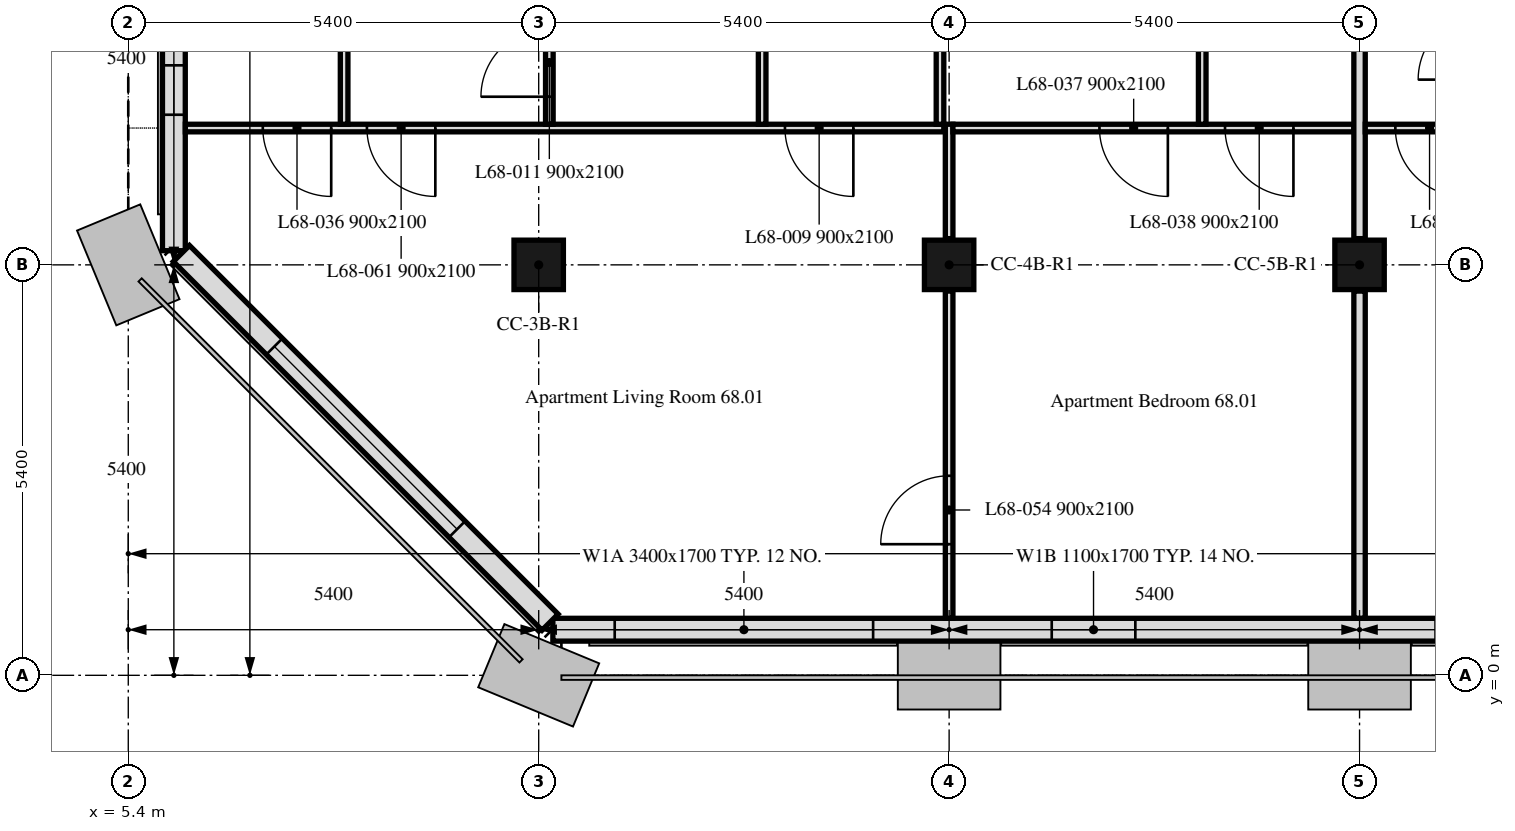
"""IFC4 building model, lengths in metres.
Left out: names, types, materials, properties, quantities, classifications, styles, units other than length and angle.
Written with IfcOpenShell. Run it as: python <this file> out.ifc"""

import sys

from ifc_helpers import new_model, si_unit, direction, frame, frame_2d, origin, origin_2d, place, context, subcontext, project, spatial, rectangle, extrude, element, fill, save


model = new_model("IFC4")
c1 = context("Model", 3, precision=1e-05, world=origin(), true_north=direction((0.0, 1.0)))
c2 = subcontext(c1, "Body", "Model", "MODEL_VIEW")
j1 = project(units=[si_unit("LENGTHUNIT", "METRE"), si_unit("PLANEANGLEUNIT", "RADIAN")], contexts=[c1])
p1 = place(None, origin())
s1 = spatial("IfcSite", under=j1, at=p1, CompositionType="ELEMENT")
p2 = place(p1, origin())
s2 = spatial("IfcBuilding", under=s1, at=p2, CompositionType="ELEMENT")
p3 = place(p2, frame((0.0, 0.0, 278.5)))
s3 = spatial("IfcBuildingStorey", under=s2, at=p3, CompositionType="ELEMENT", Elevation=278.5)
for number, where, z_axis, x_axis in (
    (1, (10.8, 5.4, 0.0), (0.0, 0.0, 1.0), (1.0, 0.0, 0.0)),
    (2, (16.2, 5.4, 0.0), (0.0, 0.0, 1.0), (1.0, 0.0, 0.0)),
    (3, (21.6, 5.4, 0.0), (0.0, 0.0, 1.0), (1.0, 0.0, 0.0)),
):
    element("IfcColumn", number, at=place(p3, frame(where, z_axis=z_axis, x_axis=x_axis)), inside=s3, PredefinedType="COLUMN", context=c2, shape_type="SweptSolid", body=[
        extrude(rectangle(XDim=0.65, YDim=0.65, at=origin_2d()), origin(), (0.0, 0.0, 1.0), 3.0),
    ])
p4 = place(p3, frame((10.986, 0.6, 0.0), z_axis=(0.0, 0.0, 1.0), x_axis=(1.0, 0.0, 0.0)))
e4 = element("IfcWall", 4, at=p4, inside=s3, PredefinedType="SOLIDWALL", context=c2, shape_type="SweptSolid", body=[
    extrude(rectangle(XDim=32.027, YDim=0.3, at=frame_2d((16.014, 0.0))), origin(), (0.0, 0.0, 1.0), 3.0),
])
p5 = place(p4, frame((0.814, 0.0, 0.9)))
e5 = element("IfcOpeningElement", 5, at=p5, cuts=e4, PredefinedType="OPENING", context=c2, shape_type="SweptSolid", body=[
    extrude(rectangle(XDim=3.4, YDim=1.7, at=frame_2d((1.7, 0.85))), frame((0.0, 0.16, 0.0), z_axis=(0.0, -1.0, 0.0), x_axis=(1.0, 0.0, 0.0)), (0.0, 0.0, 1.0), 0.32),
])
p6 = place(p4, frame((6.564, 0.0, 0.9)))
e6 = element("IfcOpeningElement", 6, at=p6, cuts=e4, PredefinedType="OPENING", context=c2, shape_type="SweptSolid", body=[
    extrude(rectangle(XDim=1.1, YDim=1.7, at=frame_2d((0.55, 0.85))), frame((0.0, 0.16, 0.0), z_axis=(0.0, -1.0, 0.0), x_axis=(1.0, 0.0, 0.0)), (0.0, 0.0, 1.0), 0.32),
])
p7 = place(p4, frame((11.614, 0.0, 0.9)))
e7 = element("IfcOpeningElement", 7, at=p7, cuts=e4, PredefinedType="OPENING", context=c2, shape_type="SweptSolid", body=[
    extrude(rectangle(XDim=3.4, YDim=1.7, at=frame_2d((1.7, 0.85))), frame((0.0, 0.16, 0.0), z_axis=(0.0, -1.0, 0.0), x_axis=(1.0, 0.0, 0.0)), (0.0, 0.0, 1.0), 0.32),
])
p8 = place(p4, frame((17.364, 0.0, 0.9)))
e8 = element("IfcOpeningElement", 8, at=p8, cuts=e4, PredefinedType="OPENING", context=c2, shape_type="SweptSolid", body=[
    extrude(rectangle(XDim=1.1, YDim=1.7, at=frame_2d((0.55, 0.85))), frame((0.0, 0.16, 0.0), z_axis=(0.0, -1.0, 0.0), x_axis=(1.0, 0.0, 0.0)), (0.0, 0.0, 1.0), 0.32),
])
p9 = place(p4, frame((22.414, 0.0, 0.9)))
e9 = element("IfcOpeningElement", 9, at=p9, cuts=e4, PredefinedType="OPENING", context=c2, shape_type="SweptSolid", body=[
    extrude(rectangle(XDim=3.4, YDim=1.7, at=frame_2d((1.7, 0.85))), frame((0.0, 0.16, 0.0), z_axis=(0.0, -1.0, 0.0), x_axis=(1.0, 0.0, 0.0)), (0.0, 0.0, 1.0), 0.32),
])
p10 = place(p4, frame((28.164, 0.0, 0.9)))
e10 = element("IfcOpeningElement", 10, at=p10, cuts=e4, PredefinedType="OPENING", context=c2, shape_type="SweptSolid", body=[
    extrude(rectangle(XDim=1.1, YDim=1.7, at=frame_2d((0.55, 0.85))), frame((0.0, 0.16, 0.0), z_axis=(0.0, -1.0, 0.0), x_axis=(1.0, 0.0, 0.0)), (0.0, 0.0, 1.0), 0.32),
])
p11 = place(p3, frame((6.0, 16.2, 0.0), z_axis=(0.0, 0.0, 1.0), x_axis=(0.0, -1.0, 0.0)))
e11 = element("IfcWall", 11, at=p11, inside=s3, PredefinedType="SOLIDWALL", context=c2, shape_type="SweptSolid", body=[
    extrude(rectangle(XDim=10.614, YDim=0.3, at=frame_2d((5.307, 0.0))), origin(), (0.0, 0.0, 1.0), 3.0),
])
p12 = place(p11, frame((1.975, 0.0, 0.9)))
e12 = element("IfcOpeningElement", 12, at=p12, cuts=e11, PredefinedType="OPENING", context=c2, shape_type="SweptSolid", body=[
    extrude(rectangle(XDim=0.65, YDim=1.7, at=frame_2d((0.325, 0.85))), frame((0.0, 0.16, 0.0), z_axis=(0.0, -1.0, 0.0), x_axis=(1.0, 0.0, 0.0)), (0.0, 0.0, 1.0), 0.32),
])
p13 = place(p11, frame((2.95, 0.0, 0.9)))
e13 = element("IfcOpeningElement", 13, at=p13, cuts=e11, PredefinedType="OPENING", context=c2, shape_type="SweptSolid", body=[
    extrude(rectangle(XDim=1.1, YDim=1.7, at=frame_2d((0.55, 0.85))), frame((0.0, 0.16, 0.0), z_axis=(0.0, -1.0, 0.0), x_axis=(1.0, 0.0, 0.0)), (0.0, 0.0, 1.0), 0.32),
])
p14 = place(p11, frame((6.75, 0.0, 0.9)))
e14 = element("IfcOpeningElement", 14, at=p14, cuts=e11, PredefinedType="OPENING", context=c2, shape_type="SweptSolid", body=[
    extrude(rectangle(XDim=1.1, YDim=1.7, at=frame_2d((0.55, 0.85))), frame((0.0, 0.16, 0.0), z_axis=(0.0, -1.0, 0.0), x_axis=(1.0, 0.0, 0.0)), (0.0, 0.0, 1.0), 0.32),
])
p15 = place(p11, frame((8.175, 0.0, 0.9)))
e15 = element("IfcOpeningElement", 15, at=p15, cuts=e11, PredefinedType="OPENING", context=c2, shape_type="SweptSolid", body=[
    extrude(rectangle(XDim=0.65, YDim=1.7, at=frame_2d((0.325, 0.85))), frame((0.0, 0.16, 0.0), z_axis=(0.0, -1.0, 0.0), x_axis=(1.0, 0.0, 0.0)), (0.0, 0.0, 1.0), 0.32),
])
p16 = place(p3, frame((6.099, 5.55, 0.0), z_axis=(0.0, 0.0, 1.0), x_axis=(0.707106781187, -0.707106781187, 0.0)))
e16 = element("IfcWall", 16, at=p16, inside=s3, PredefinedType="SOLIDWALL", context=c2, shape_type="SweptSolid", body=[
    extrude(rectangle(XDim=6.86, YDim=0.3, at=frame_2d((3.43, 0.0))), origin(), (0.0, 0.0, 1.0), 3.0),
])
p17 = place(p16, frame((1.73, 0.0, 0.9)))
e17 = element("IfcOpeningElement", 17, at=p17, cuts=e16, PredefinedType="OPENING", context=c2, shape_type="SweptSolid", body=[
    extrude(rectangle(XDim=3.4, YDim=1.7, at=frame_2d((1.7, 0.85))), frame((0.0, 0.16, 0.0), z_axis=(0.0, -1.0, 0.0), x_axis=(1.0, 0.0, 0.0)), (0.0, 0.0, 1.0), 0.32),
])
p18 = place(p3, frame((16.2, 0.751, 0.0), z_axis=(0.0, 0.0, 1.0), x_axis=(0.0, 1.0, 0.0)))
e18 = element("IfcWall", 18, at=p18, inside=s3, PredefinedType="PARTITIONING", context=c2, shape_type="SweptSolid", body=[
    extrude(rectangle(XDim=4.304, YDim=0.1, at=frame_2d((2.152, 0.0))), origin(), (0.0, 0.0, 1.0), 2.4),
])
p19 = place(p18, frame((0.974, 0.0, 0.0)))
e19 = element("IfcOpeningElement", 19, at=p19, cuts=e18, PredefinedType="OPENING", context=c2, shape_type="SweptSolid", body=[
    extrude(rectangle(XDim=0.9, YDim=2.1, at=frame_2d((0.45, 1.05))), frame((0.0, 0.05, 0.0), z_axis=(0.0, -1.0, 0.0), x_axis=(1.0, 0.0, 0.0)), (0.0, 0.0, 1.0), 0.1),
])
p20 = place(p3, frame((16.2, 5.745, 0.0), z_axis=(0.0, 0.0, 1.0), x_axis=(0.0, 1.0, 0.0)))
e20 = element("IfcWall", 20, at=p20, inside=s3, PredefinedType="PARTITIONING", context=c2, shape_type="SweptSolid", body=[
    extrude(rectangle(XDim=1.505, YDim=0.1, at=frame_2d((0.752, 0.0))), origin(), (0.0, 0.0, 1.0), 2.4),
])
p21 = place(p3, frame((16.13, 7.2, 0.0), z_axis=(0.0, 0.0, 1.0), x_axis=(-1.0, 0.0, 0.0)))
e21 = element("IfcWall", 21, at=p21, inside=s3, PredefinedType="PARTITIONING", context=c2, shape_type="SweptSolid", body=[
    extrude(rectangle(XDim=9.979, YDim=0.1, at=frame_2d((4.99, 0.0))), origin(), (0.0, 0.0, 1.0), 3.0),
])
p22 = place(p21, frame((1.19, 0.0, 0.0)))
e22 = element("IfcOpeningElement", 22, at=p22, cuts=e21, PredefinedType="OPENING", context=c2, shape_type="SweptSolid", body=[
    extrude(rectangle(XDim=0.9, YDim=2.1, at=frame_2d((0.45, 1.05))), frame((0.0, 0.05, 0.0), z_axis=(0.0, -1.0, 0.0), x_axis=(1.0, 0.0, 0.0)), (0.0, 0.0, 1.0), 0.1),
])
p23 = place(p21, frame((8.06, 0.0, 0.0)))
e23 = element("IfcOpeningElement", 23, at=p23, cuts=e21, PredefinedType="OPENING", context=c2, shape_type="SweptSolid", body=[
    extrude(rectangle(XDim=0.9, YDim=2.1, at=frame_2d((0.45, 1.05))), frame((0.0, 0.05, 0.0), z_axis=(0.0, -1.0, 0.0), x_axis=(1.0, 0.0, 0.0)), (0.0, 0.0, 1.0), 0.1),
])
p24 = place(p21, frame((6.69, 0.0, 0.0)))
e24 = element("IfcOpeningElement", 24, at=p24, cuts=e21, PredefinedType="OPENING", context=c2, shape_type="SweptSolid", body=[
    extrude(rectangle(XDim=0.9, YDim=2.1, at=frame_2d((0.45, 1.05))), frame((0.0, 0.05, 0.0), z_axis=(0.0, -1.0, 0.0), x_axis=(1.0, 0.0, 0.0)), (0.0, 0.0, 1.0), 0.1),
])
p25 = place(p3, frame((21.6, 0.751, 0.0), z_axis=(0.0, 0.0, 1.0), x_axis=(0.0, 1.0, 0.0)))
e25 = element("IfcWall", 25, at=p25, inside=s3, PredefinedType="PARTITIONING", context=c2, shape_type="SweptSolid", body=[
    extrude(rectangle(XDim=4.304, YDim=0.15, at=frame_2d((2.152, 0.0))), origin(), (0.0, 0.0, 1.0), 2.4),
])
p26 = place(p3, frame((21.525, 7.2, 0.0), z_axis=(0.0, 0.0, 1.0), x_axis=(-1.0, 0.0, 0.0)))
e26 = element("IfcWall", 26, at=p26, inside=s3, PredefinedType="PARTITIONING", context=c2, shape_type="SweptSolid", body=[
    extrude(rectangle(XDim=5.275, YDim=0.1, at=frame_2d((2.637, 0.0))), origin(), (0.0, 0.0, 1.0), 3.0),
])
p27 = place(p26, frame((2.447, 0.0, 0.0)))
e27 = element("IfcOpeningElement", 27, at=p27, cuts=e26, PredefinedType="OPENING", context=c2, shape_type="SweptSolid", body=[
    extrude(rectangle(XDim=0.9, YDim=2.1, at=frame_2d((0.45, 1.05))), frame((0.0, 0.05, 0.0), z_axis=(0.0, -1.0, 0.0), x_axis=(1.0, 0.0, 0.0)), (0.0, 0.0, 1.0), 0.1),
])
p28 = place(p26, frame((0.795, 0.0, 0.0)))
e28 = element("IfcOpeningElement", 28, at=p28, cuts=e26, PredefinedType="OPENING", context=c2, shape_type="SweptSolid", body=[
    extrude(rectangle(XDim=0.9, YDim=2.1, at=frame_2d((0.45, 1.05))), frame((0.0, 0.05, 0.0), z_axis=(0.0, -1.0, 0.0), x_axis=(1.0, 0.0, 0.0)), (0.0, 0.0, 1.0), 0.1),
])
p29 = place(p3, frame((8.24, 7.25, 0.0), z_axis=(0.0, 0.0, 1.0), x_axis=(0.0, 1.0, 0.0)))
e29 = element("IfcWall", 29, at=p29, inside=s3, PredefinedType="PARTITIONING", context=c2, shape_type="SweptSolid", body=[
    extrude(rectangle(XDim=7.075, YDim=0.1, at=frame_2d((3.538, 0.0))), origin(), (0.0, 0.0, 1.0), 3.0),
])
p30 = place(p29, frame((5.2, 0.0, 0.0)))
e30 = element("IfcOpeningElement", 30, at=p30, cuts=e29, PredefinedType="OPENING", context=c2, shape_type="SweptSolid", body=[
    extrude(rectangle(XDim=0.9, YDim=2.1, at=frame_2d((0.45, 1.05))), frame((0.0, 0.05, 0.0), z_axis=(0.0, -1.0, 0.0), x_axis=(1.0, 0.0, 0.0)), (0.0, 0.0, 1.0), 0.1),
])
p31 = place(p29, frame((1.488, 0.0, 0.0)))
e31 = element("IfcOpeningElement", 31, at=p31, cuts=e29, PredefinedType="OPENING", context=c2, shape_type="SweptSolid", body=[
    extrude(rectangle(XDim=0.9, YDim=2.1, at=frame_2d((0.45, 1.05))), frame((0.0, 0.05, 0.0), z_axis=(0.0, -1.0, 0.0), x_axis=(1.0, 0.0, 0.0)), (0.0, 0.0, 1.0), 0.1),
])
p32 = place(p3, frame((10.94, 7.25, 0.0), z_axis=(0.0, 0.0, 1.0), x_axis=(0.0, 1.0, 0.0)))
e32 = element("IfcWall", 32, at=p32, inside=s3, PredefinedType="PARTITIONING", context=c2, shape_type="SweptSolid", body=[
    extrude(rectangle(XDim=3.205, YDim=0.1, at=frame_2d((1.603, 0.0))), origin(), (0.0, 0.0, 1.0), 3.0),
])
p33 = place(p32, frame((0.362, 0.0, 0.0)))
e33 = element("IfcOpeningElement", 33, at=p33, cuts=e32, PredefinedType="OPENING", context=c2, shape_type="SweptSolid", body=[
    extrude(rectangle(XDim=0.9, YDim=2.1, at=frame_2d((0.45, 1.05))), frame((0.0, 0.05, 0.0), z_axis=(0.0, -1.0, 0.0), x_axis=(1.0, 0.0, 0.0)), (0.0, 0.0, 1.0), 0.1),
])
p34 = place(p3, frame((13.74, 7.25, 0.0), z_axis=(0.0, 0.0, 1.0), x_axis=(0.0, 1.0, 0.0)))
e34 = element("IfcWall", 34, at=p34, inside=s3, PredefinedType="PARTITIONING", context=c2, shape_type="SweptSolid", body=[
    extrude(rectangle(XDim=7.075, YDim=0.1, at=frame_2d((3.538, 0.0))), origin(), (0.0, 0.0, 1.0), 3.0),
])
p35 = place(p3, frame((16.08, 7.25, 0.0), z_axis=(0.0, 0.0, 1.0), x_axis=(0.0, 1.0, 0.0)))
e35 = element("IfcWall", 35, at=p35, inside=s3, PredefinedType="PARTITIONING", context=c2, shape_type="SweptSolid", body=[
    extrude(rectangle(XDim=3.205, YDim=0.1, at=frame_2d((1.603, 0.0))), origin(), (0.0, 0.0, 1.0), 2.4),
])
p36 = place(p3, frame((19.53, 7.25, 0.0), z_axis=(0.0, 0.0, 1.0), x_axis=(0.0, 1.0, 0.0)))
e36 = element("IfcWall", 36, at=p36, inside=s3, PredefinedType="PARTITIONING", context=c2, shape_type="SweptSolid", body=[
    extrude(rectangle(XDim=7.075, YDim=0.1, at=frame_2d((3.538, 0.0))), origin(), (0.0, 0.0, 1.0), 3.0),
])
p37 = place(p3, frame((21.6, 5.745, 0.0), z_axis=(0.0, 0.0, 1.0), x_axis=(0.0, 1.0, 0.0)))
e37 = element("IfcWall", 37, at=p37, inside=s3, PredefinedType="PARTITIONING", context=c2, shape_type="SweptSolid", body=[
    extrude(rectangle(XDim=4.71, YDim=0.15, at=frame_2d((2.355, 0.0))), origin(), (0.0, 0.0, 1.0), 2.4),
])
p38 = place(p3, frame((26.772, 7.2, 0.0), z_axis=(0.0, 0.0, 1.0), x_axis=(-1.0, 0.0, 0.0)))
e38 = element("IfcWall", 38, at=p38, inside=s3, PredefinedType="PARTITIONING", context=c2, shape_type="SweptSolid", body=[
    extrude(rectangle(XDim=5.097, YDim=0.1, at=frame_2d((2.548, 0.0))), origin(), (0.0, 0.0, 1.0), 3.0),
])
p39 = place(p38, frame((3.801, 0.0, 0.0)))
e39 = element("IfcOpeningElement", 39, at=p39, cuts=e38, PredefinedType="OPENING", context=c2, shape_type="SweptSolid", body=[
    extrude(rectangle(XDim=0.9, YDim=2.1, at=frame_2d((0.45, 1.05))), frame((0.0, 0.05, 0.0), z_axis=(0.0, -1.0, 0.0), x_axis=(1.0, 0.0, 0.0)), (0.0, 0.0, 1.0), 0.1),
])
p40 = place(p38, frame((1.732, 0.0, 0.0)))
e40 = element("IfcOpeningElement", 40, at=p40, cuts=e38, PredefinedType="OPENING", context=c2, shape_type="SweptSolid", body=[
    extrude(rectangle(XDim=0.9, YDim=2.1, at=frame_2d((0.45, 1.05))), frame((0.0, 0.05, 0.0), z_axis=(0.0, -1.0, 0.0), x_axis=(1.0, 0.0, 0.0)), (0.0, 0.0, 1.0), 0.1),
])
p41 = place(p5, origin())
e41 = element("IfcWindow", 41, at=p41, inside=s3, PartitioningType="SINGLE_PANEL", PredefinedType="WINDOW", context=c2, shape_type="SweptSolid", body=[
    extrude(rectangle(XDim=3.4, YDim=1.7, at=frame_2d((1.7, 0.85))), frame((0.0, 0.03, 0.0), z_axis=(0.0, -1.0, 0.0), x_axis=(1.0, 0.0, 0.0)), (0.0, 0.0, 1.0), 0.06),
])
fill(e5, e41)
p42 = place(p6, origin())
e42 = element("IfcWindow", 42, at=p42, inside=s3, PartitioningType="SINGLE_PANEL", PredefinedType="WINDOW", context=c2, shape_type="SweptSolid", body=[
    extrude(rectangle(XDim=1.1, YDim=1.7, at=frame_2d((0.55, 0.85))), frame((0.0, 0.03, 0.0), z_axis=(0.0, -1.0, 0.0), x_axis=(1.0, 0.0, 0.0)), (0.0, 0.0, 1.0), 0.06),
])
fill(e6, e42)
p43 = place(p7, origin())
e43 = element("IfcWindow", 43, at=p43, inside=s3, PartitioningType="SINGLE_PANEL", PredefinedType="WINDOW", context=c2, shape_type="SweptSolid", body=[
    extrude(rectangle(XDim=3.4, YDim=1.7, at=frame_2d((1.7, 0.85))), frame((0.0, 0.03, 0.0), z_axis=(0.0, -1.0, 0.0), x_axis=(1.0, 0.0, 0.0)), (0.0, 0.0, 1.0), 0.06),
])
fill(e7, e43)
p44 = place(p15, origin())
e44 = element("IfcWindow", 44, at=p44, inside=s3, PartitioningType="SINGLE_PANEL", PredefinedType="WINDOW", context=c2, shape_type="SweptSolid", body=[
    extrude(rectangle(XDim=0.65, YDim=1.7, at=frame_2d((0.325, 0.85))), frame((0.0, 0.03, 0.0), z_axis=(0.0, -1.0, 0.0), x_axis=(1.0, 0.0, 0.0)), (0.0, 0.0, 1.0), 0.06),
])
fill(e15, e44)
p45 = place(p17, origin())
e45 = element("IfcWindow", 45, at=p45, inside=s3, PartitioningType="SINGLE_PANEL", PredefinedType="WINDOW", context=c2, shape_type="SweptSolid", body=[
    extrude(rectangle(XDim=3.4, YDim=1.7, at=frame_2d((1.7, 0.85))), frame((0.0, 0.03, 0.0), z_axis=(0.0, -1.0, 0.0), x_axis=(1.0, 0.0, 0.0)), (0.0, 0.0, 1.0), 0.06),
])
fill(e17, e45)
p46 = place(p22, origin())
e46 = element("IfcDoor", 46, at=p46, inside=s3, OperationType="SINGLE_SWING_LEFT", PredefinedType="DOOR", context=c2, shape_type="SweptSolid", body=[
    extrude(rectangle(XDim=0.9, YDim=2.1, at=frame_2d((0.45, 1.05))), frame((0.0, 0.025, 0.0), z_axis=(0.0, -1.0, 0.0), x_axis=(1.0, 0.0, 0.0)), (0.0, 0.0, 1.0), 0.05),
])
fill(e22, e46)
p47 = place(p33, origin())
e47 = element("IfcDoor", 47, at=p47, inside=s3, OperationType="SINGLE_SWING_LEFT", PredefinedType="DOOR", context=c2, shape_type="SweptSolid", body=[
    extrude(rectangle(XDim=0.9, YDim=2.1, at=frame_2d((0.45, 1.05))), frame((0.0, 0.025, 0.0), z_axis=(0.0, -1.0, 0.0), x_axis=(1.0, 0.0, 0.0)), (0.0, 0.0, 1.0), 0.05),
])
fill(e33, e47)
p48 = place(p23, origin())
e48 = element("IfcDoor", 48, at=p48, inside=s3, OperationType="SINGLE_SWING_RIGHT", PredefinedType="DOOR", context=c2, shape_type="SweptSolid", body=[
    extrude(rectangle(XDim=0.9, YDim=2.1, at=frame_2d((0.45, 1.05))), frame((0.0, 0.025, 0.0), z_axis=(0.0, -1.0, 0.0), x_axis=(1.0, 0.0, 0.0)), (0.0, 0.0, 1.0), 0.05),
])
fill(e23, e48)
p49 = place(p27, origin())
e49 = element("IfcDoor", 49, at=p49, inside=s3, OperationType="SINGLE_SWING_RIGHT", PredefinedType="DOOR", context=c2, shape_type="SweptSolid", body=[
    extrude(rectangle(XDim=0.9, YDim=2.1, at=frame_2d((0.45, 1.05))), frame((0.0, 0.025, 0.0), z_axis=(0.0, -1.0, 0.0), x_axis=(1.0, 0.0, 0.0)), (0.0, 0.0, 1.0), 0.05),
])
fill(e27, e49)
p50 = place(p28, origin())
e50 = element("IfcDoor", 50, at=p50, inside=s3, OperationType="SINGLE_SWING_LEFT", PredefinedType="DOOR", context=c2, shape_type="SweptSolid", body=[
    extrude(rectangle(XDim=0.9, YDim=2.1, at=frame_2d((0.45, 1.05))), frame((0.0, 0.025, 0.0), z_axis=(0.0, -1.0, 0.0), x_axis=(1.0, 0.0, 0.0)), (0.0, 0.0, 1.0), 0.05),
])
fill(e28, e50)
p51 = place(p39, origin())
e51 = element("IfcDoor", 51, at=p51, inside=s3, OperationType="SINGLE_SWING_RIGHT", PredefinedType="DOOR", context=c2, shape_type="SweptSolid", body=[
    extrude(rectangle(XDim=0.9, YDim=2.1, at=frame_2d((0.45, 1.05))), frame((0.0, 0.025, 0.0), z_axis=(0.0, -1.0, 0.0), x_axis=(1.0, 0.0, 0.0)), (0.0, 0.0, 1.0), 0.05),
])
fill(e39, e51)
p52 = place(p19, origin())
e52 = element("IfcDoor", 52, at=p52, inside=s3, OperationType="SINGLE_SWING_RIGHT", PredefinedType="DOOR", context=c2, shape_type="SweptSolid", body=[
    extrude(rectangle(XDim=0.9, YDim=2.1, at=frame_2d((0.45, 1.05))), frame((0.0, 0.025, 0.0), z_axis=(0.0, -1.0, 0.0), x_axis=(1.0, 0.0, 0.0)), (0.0, 0.0, 1.0), 0.05),
])
fill(e19, e52)
p53 = place(p24, origin())
e53 = element("IfcDoor", 53, at=p53, inside=s3, OperationType="SINGLE_SWING_LEFT", PredefinedType="DOOR", context=c2, shape_type="SweptSolid", body=[
    extrude(rectangle(XDim=0.9, YDim=2.1, at=frame_2d((0.45, 1.05))), frame((0.0, 0.025, 0.0), z_axis=(0.0, -1.0, 0.0), x_axis=(1.0, 0.0, 0.0)), (0.0, 0.0, 1.0), 0.05),
])
fill(e24, e53)
save(model, sys.argv[1])
